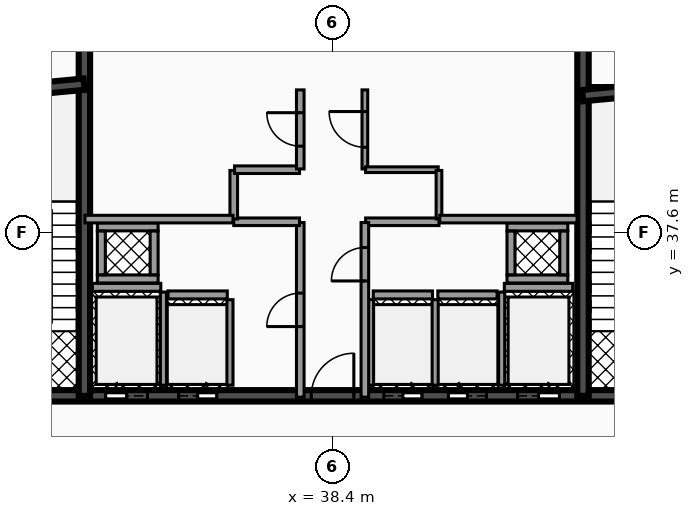
"""IFC4 building model, lengths in metres.
Left out: names, types, materials, properties, quantities, classifications, styles, units other than length and angle.
Written with IfcOpenShell. Run it as: python <this file> out.ifc"""

import sys

from ifc_helpers import new_model, si_unit, direction, frame, frame_2d, origin, place, context, subcontext, project, spatial, rectangle, extrude, element, fill, save


model = new_model("IFC4")
c1 = context("Model", 3, precision=1e-05, world=origin(), true_north=direction((0.0, 1.0)))
c2 = subcontext(c1, "Body", "Model", "MODEL_VIEW")
j1 = project(units=[si_unit("LENGTHUNIT", "METRE"), si_unit("PLANEANGLEUNIT", "RADIAN")], contexts=[c1])
p1 = place(None, origin())
s1 = spatial("IfcSite", under=j1, at=p1, CompositionType="ELEMENT")
p2 = place(p1, origin())
s2 = spatial("IfcBuilding", under=s1, at=p2, CompositionType="ELEMENT")
p3 = place(p2, frame((0.0, 0.0, 204.34)))
s3 = spatial("IfcBuildingStorey", under=s2, at=p3, CompositionType="ELEMENT", Elevation=204.34)
p4 = place(p3, frame((28.5, 33.3, 0.0), z_axis=(0.0, 0.0, 1.0), x_axis=(1.0, 0.0, 0.0)))
e1 = element("IfcWall", 1, at=p4, inside=s3, PredefinedType="SHEAR", context=c2, shape_type="SweptSolid", body=[
    extrude(rectangle(XDim=19.86, YDim=0.3, at=frame_2d((9.93, 0.0))), origin(), (0.0, 0.0, 1.0), 4.2),
])
p5 = place(p4, frame((3.93, 0.0, 0.0)))
e2 = element("IfcOpeningElement", 2, at=p5, cuts=e1, PredefinedType="OPENING", context=c2, shape_type="SweptSolid", body=[
    extrude(rectangle(XDim=1.1, YDim=2.15, at=frame_2d((0.55, 1.075))), frame((0.0, 0.16, 0.0), z_axis=(0.0, -1.0, 0.0), x_axis=(1.0, 0.0, 0.0)), (0.0, 0.0, 1.0), 0.32),
])
p6 = place(p4, frame((14.77, 0.0, 0.0)))
e3 = element("IfcOpeningElement", 3, at=p6, cuts=e1, PredefinedType="OPENING", context=c2, shape_type="SweptSolid", body=[
    extrude(rectangle(XDim=1.1, YDim=2.15, at=frame_2d((0.55, 1.075))), frame((0.0, 0.16, 0.0), z_axis=(0.0, -1.0, 0.0), x_axis=(1.0, 0.0, 0.0)), (0.0, 0.0, 1.0), 0.32),
])
p7 = place(p4, frame((11.25, 0.0, 0.0)))
e4 = element("IfcOpeningElement", 4, at=p7, cuts=e1, PredefinedType="OPENING", context=c2, shape_type="SweptSolid", body=[
    extrude(rectangle(XDim=1.0, YDim=2.1, at=frame_2d((0.5, 1.05))), frame((0.0, 0.16, 0.0), z_axis=(0.0, -1.0, 0.0), x_axis=(1.0, 0.0, 0.0)), (0.0, 0.0, 1.0), 0.32),
])
p8 = place(p4, frame((12.95, 0.0, 0.0)))
e5 = element("IfcOpeningElement", 5, at=p8, cuts=e1, PredefinedType="OPENING", context=c2, shape_type="SweptSolid", body=[
    extrude(rectangle(XDim=1.0, YDim=2.1, at=frame_2d((0.5, 1.05))), frame((0.0, 0.16, 0.0), z_axis=(0.0, -1.0, 0.0), x_axis=(1.0, 0.0, 0.0)), (0.0, 0.0, 1.0), 0.32),
])
p9 = place(p4, frame((5.85, 0.0, 0.0)))
e6 = element("IfcOpeningElement", 6, at=p9, cuts=e1, PredefinedType="OPENING", context=c2, shape_type="SweptSolid", body=[
    extrude(rectangle(XDim=1.0, YDim=2.1, at=frame_2d((0.5, 1.05))), frame((0.0, 0.16, 0.0), z_axis=(0.0, -1.0, 0.0), x_axis=(1.0, 0.0, 0.0)), (0.0, 0.0, 1.0), 0.32),
])
p10 = place(p4, frame((1.21, 0.0, 0.0)))
e7 = element("IfcOpeningElement", 7, at=p10, cuts=e1, PredefinedType="OPENING", context=c2, shape_type="SweptSolid", body=[
    extrude(rectangle(XDim=1.1, YDim=2.2, at=frame_2d((0.55, 1.1))), frame((0.0, 0.16, 0.0), z_axis=(0.0, -1.0, 0.0), x_axis=(1.0, 0.0, 0.0)), (0.0, 0.0, 1.0), 0.32),
])
p11 = place(p4, frame((9.34, 0.0, 0.0)))
e8 = element("IfcOpeningElement", 8, at=p11, cuts=e1, PredefinedType="OPENING", context=c2, shape_type="SweptSolid", body=[
    extrude(rectangle(XDim=1.12, YDim=2.05, at=frame_2d((0.56, 1.025))), frame((0.0, 0.16, 0.0), z_axis=(0.0, -1.0, 0.0), x_axis=(1.0, 0.0, 0.0)), (0.0, 0.0, 1.0), 0.32),
])
p12 = place(p4, frame((17.55, 0.0, 0.0)))
e9 = element("IfcOpeningElement", 9, at=p12, cuts=e1, PredefinedType="OPENING", context=c2, shape_type="SweptSolid", body=[
    extrude(rectangle(XDim=1.1, YDim=2.2, at=frame_2d((0.55, 1.1))), frame((0.0, 0.16, 0.0), z_axis=(0.0, -1.0, 0.0), x_axis=(1.0, 0.0, 0.0)), (0.0, 0.0, 1.0), 0.32),
])
for number, where, z_axis, x_axis in (
    (10, (31.87, 33.3, 0.0), (0.0, 0.0, 1.0), (0.0, 1.0, 0.0)),
    (11, (44.99, 33.3, 0.0), (0.0, 0.0, 1.0), (0.0, 1.0, 0.0)),
):
    element("IfcWall", number, at=place(p3, frame(where, z_axis=z_axis, x_axis=x_axis)), inside=s3, PredefinedType="SHEAR", context=c2, shape_type="SweptSolid", body=[
        extrude(rectangle(XDim=10.1, YDim=0.3, at=frame_2d((5.05, 0.0))), origin(), (0.0, 0.0, 1.0), 4.2),
    ])
p13 = place(p3, frame((28.64, 41.2, 0.0), z_axis=(0.0, 0.0, 1.0), x_axis=(0.995687118776, 0.092774789157, 0.0)))
e12 = element("IfcWall", 12, at=p13, inside=s3, PredefinedType="SHEAR", context=c2, shape_type="SweptSolid", body=[
    extrude(rectangle(XDim=3.234, YDim=0.3, at=frame_2d((1.617, 0.0))), origin(), (0.0, 0.0, 1.0), 4.2),
])
p14 = place(p3, frame((44.98, 41.2, 0.0), z_axis=(0.0, 0.0, 1.0), x_axis=(0.995686468965, 0.09278176286, 0.0)))
e13 = element("IfcWall", 13, at=p14, inside=s3, PredefinedType="SHEAR", context=c2, shape_type="SweptSolid", body=[
    extrude(rectangle(XDim=3.234, YDim=0.3, at=frame_2d((1.617, 0.0))), origin(), (0.0, 0.0, 1.0), 4.2),
])
p15 = place(p3, frame((32.08, 36.155, 0.0), z_axis=(0.0, 0.0, 1.0), x_axis=(1.0, 0.0, 0.0)))
e14 = element("IfcWall", 14, at=p15, inside=s3, PredefinedType="SOLIDWALL", context=c2, shape_type="SweptSolid", body=[
    extrude(rectangle(XDim=1.8, YDim=0.21, at=frame_2d((0.9, 0.0))), origin(), (0.0, 0.0, 1.0), 3.172),
])
p16 = place(p3, frame((33.95, 33.58, 0.0), z_axis=(0.0, 0.0, 1.0), x_axis=(0.0, 1.0, 0.0)))
e15 = element("IfcWall", 15, at=p16, inside=s3, PredefinedType="SOLIDWALL", context=c2, shape_type="SweptSolid", body=[
    extrude(rectangle(XDim=2.45, YDim=0.16, at=frame_2d((1.225, 0.0))), origin(), (0.0, 0.0, 1.0), 3.172),
])
p17 = place(p3, frame((42.92, 36.155, 0.0), z_axis=(0.0, 0.0, 1.0), x_axis=(1.0, 0.0, 0.0)))
e16 = element("IfcWall", 16, at=p17, inside=s3, PredefinedType="SOLIDWALL", context=c2, shape_type="SweptSolid", body=[
    extrude(rectangle(XDim=1.8, YDim=0.21, at=frame_2d((0.9, 0.0))), origin(), (0.0, 0.0, 1.0), 3.172),
])
p18 = place(p3, frame((42.85, 33.58, 0.0), z_axis=(0.0, 0.0, 1.0), x_axis=(0.0, 1.0, 0.0)))
e17 = element("IfcWall", 17, at=p18, inside=s3, PredefinedType="SOLIDWALL", context=c2, shape_type="SweptSolid", body=[
    extrude(rectangle(XDim=2.45, YDim=0.16, at=frame_2d((1.225, 0.0))), origin(), (0.0, 0.0, 1.0), 3.172),
])
p19 = place(p3, frame((39.47, 35.955, 0.0), z_axis=(0.0, 0.0, 1.0), x_axis=(1.0, 0.0, 0.0)))
e18 = element("IfcWall", 18, at=p19, inside=s3, PredefinedType="SOLIDWALL", context=c2, shape_type="SweptSolid", body=[
    extrude(rectangle(XDim=1.56, YDim=0.21, at=frame_2d((0.78, 0.0))), origin(), (0.0, 0.0, 1.0), 3.172),
])
for number, where, z_axis, x_axis in (
    (19, (39.4, 33.58, 0.0), (0.0, 0.0, 1.0), (0.0, 1.0, 0.0)),
    (20, (41.1, 33.58, 0.0), (0.0, 0.0, 1.0), (0.0, 1.0, 0.0)),
):
    element("IfcWall", number, at=place(p3, frame(where, z_axis=z_axis, x_axis=x_axis)), inside=s3, PredefinedType="SOLIDWALL", context=c2, shape_type="SweptSolid", body=[
        extrude(rectangle(XDim=2.25, YDim=0.16, at=frame_2d((1.125, 0.0))), origin(), (0.0, 0.0, 1.0), 3.172),
    ])
p20 = place(p3, frame((41.17, 35.955, 0.0), z_axis=(0.0, 0.0, 1.0), x_axis=(1.0, 0.0, 0.0)))
e21 = element("IfcWall", 21, at=p20, inside=s3, PredefinedType="SOLIDWALL", context=c2, shape_type="SweptSolid", body=[
    extrude(rectangle(XDim=1.56, YDim=0.21, at=frame_2d((0.78, 0.0))), origin(), (0.0, 0.0, 1.0), 3.172),
])
p21 = place(p3, frame((34.07, 35.955, 0.0), z_axis=(0.0, 0.0, 1.0), x_axis=(1.0, 0.0, 0.0)))
e22 = element("IfcWall", 22, at=p21, inside=s3, PredefinedType="SOLIDWALL", context=c2, shape_type="SweptSolid", body=[
    extrude(rectangle(XDim=1.56, YDim=0.21, at=frame_2d((0.78, 0.0))), origin(), (0.0, 0.0, 1.0), 3.172),
])
p22 = place(p3, frame((35.7, 33.58, 0.0), z_axis=(0.0, 0.0, 1.0), x_axis=(0.0, 1.0, 0.0)))
e23 = element("IfcWall", 23, at=p22, inside=s3, PredefinedType="SOLIDWALL", context=c2, shape_type="SweptSolid", body=[
    extrude(rectangle(XDim=2.25, YDim=0.16, at=frame_2d((1.125, 0.0))), origin(), (0.0, 0.0, 1.0), 3.172),
])
for number, where, z_axis, x_axis in (
    (24, (32.21, 36.375, 0.0), (0.0, 0.0, 1.0), (1.0, 0.0, 0.0)),
    (25, (32.21, 37.745, 0.0), (0.0, 0.0, 1.0), (1.0, 0.0, 0.0)),
):
    element("IfcWall", number, at=place(p3, frame(where, z_axis=z_axis, x_axis=x_axis)), inside=s3, PredefinedType="SOLIDWALL", context=c2, shape_type="SweptSolid", body=[
        extrude(rectangle(XDim=1.6, YDim=0.21, at=frame_2d((0.8, 0.0))), origin(), (0.0, 0.0, 1.0), 4.2),
    ])
for number, where, z_axis, x_axis in (
    (26, (32.315, 36.485, 0.0), (0.0, 0.0, 1.0), (0.0, 1.0, 0.0)),
    (27, (33.705, 36.485, 0.0), (0.0, 0.0, 1.0), (0.0, 1.0, 0.0)),
):
    element("IfcWall", number, at=place(p3, frame(where, z_axis=z_axis, x_axis=x_axis)), inside=s3, PredefinedType="SOLIDWALL", context=c2, shape_type="SweptSolid", body=[
        extrude(rectangle(XDim=1.15, YDim=0.21, at=frame_2d((0.575, 0.0))), origin(), (0.0, 0.0, 1.0), 4.2),
    ])
for number, where, z_axis, x_axis in (
    (28, (42.99, 36.375, 0.0), (0.0, 0.0, 1.0), (1.0, 0.0, 0.0)),
    (29, (42.99, 37.745, 0.0), (0.0, 0.0, 1.0), (1.0, 0.0, 0.0)),
):
    element("IfcWall", number, at=place(p3, frame(where, z_axis=z_axis, x_axis=x_axis)), inside=s3, PredefinedType="SOLIDWALL", context=c2, shape_type="SweptSolid", body=[
        extrude(rectangle(XDim=1.6, YDim=0.21, at=frame_2d((0.8, 0.0))), origin(), (0.0, 0.0, 1.0), 4.2),
    ])
for number, where, z_axis, x_axis in (
    (30, (43.095, 36.485, 0.0), (0.0, 0.0, 1.0), (0.0, 1.0, 0.0)),
    (31, (44.485, 36.485, 0.0), (0.0, 0.0, 1.0), (0.0, 1.0, 0.0)),
):
    element("IfcWall", number, at=place(p3, frame(where, z_axis=z_axis, x_axis=x_axis)), inside=s3, PredefinedType="SOLIDWALL", context=c2, shape_type="SweptSolid", body=[
        extrude(rectangle(XDim=1.15, YDim=0.21, at=frame_2d((0.575, 0.0))), origin(), (0.0, 0.0, 1.0), 4.2),
    ])
p23 = place(p3, frame((37.55, 33.265, 0.0), z_axis=(0.0, 0.0, 1.0), x_axis=(0.0, 1.0, 0.0)))
e32 = element("IfcWall", 32, at=p23, inside=s3, PredefinedType="PARTITIONING", context=c2, shape_type="SweptSolid", body=[
    extrude(rectangle(XDim=4.595, YDim=0.2, at=frame_2d((2.298, 0.0))), origin(), (0.0, 0.0, 1.0), 3.157),
])
p24 = place(p23, frame((1.857, 0.0, 0.0)))
e33 = element("IfcOpeningElement", 33, at=p24, cuts=e32, PredefinedType="OPENING", context=c2, shape_type="SweptSolid", body=[
    extrude(rectangle(XDim=0.88, YDim=2.05, at=frame_2d((0.44, 1.025))), frame((0.0, 0.11, 0.0), z_axis=(0.0, -1.0, 0.0), x_axis=(1.0, 0.0, 0.0)), (0.0, 0.0, 1.0), 0.22),
])
p25 = place(p3, frame((35.8, 37.88, 0.0), z_axis=(0.0, 0.0, 1.0), x_axis=(1.0, 0.0, 0.0)))
e34 = element("IfcWall", 34, at=p25, inside=s3, PredefinedType="PARTITIONING", context=c2, shape_type="SweptSolid", body=[
    extrude(rectangle(XDim=1.73, YDim=0.2, at=frame_2d((0.865, 0.0))), origin(), (0.0, 0.0, 1.0), 3.157),
])
p26 = place(p3, frame((35.8, 37.955, 0.0), z_axis=(0.0, 0.0, 1.0), x_axis=(0.0, 1.0, 0.0)))
e35 = element("IfcWall", 35, at=p26, inside=s3, PredefinedType="PARTITIONING", context=c2, shape_type="SweptSolid", body=[
    extrude(rectangle(XDim=1.275, YDim=0.2, at=frame_2d((0.637, 0.0))), origin(), (0.0, 0.0, 1.0), 3.157),
])
p27 = place(p3, frame((35.82, 39.25, 0.0), z_axis=(0.0, 0.0, 1.0), x_axis=(1.0, 0.0, 0.0)))
e36 = element("IfcWall", 36, at=p27, inside=s3, PredefinedType="PARTITIONING", context=c2, shape_type="SweptSolid", body=[
    extrude(rectangle(XDim=1.71, YDim=0.2, at=frame_2d((0.855, 0.0))), origin(), (0.0, 0.0, 1.0), 3.157),
])
p28 = place(p3, frame((37.55, 39.27, 0.0), z_axis=(0.0, 0.0, 1.0), x_axis=(0.0, 1.0, 0.0)))
e37 = element("IfcWall", 37, at=p28, inside=s3, PredefinedType="PARTITIONING", context=c2, shape_type="SweptSolid", body=[
    extrude(rectangle(XDim=2.08, YDim=0.2, at=frame_2d((1.04, 0.0))), origin(), (0.0, 0.0, 1.0), 3.157),
])
p29 = place(p28, frame((0.6, 0.0, 0.0)))
e38 = element("IfcOpeningElement", 38, at=p29, cuts=e37, PredefinedType="OPENING", context=c2, shape_type="SweptSolid", body=[
    extrude(rectangle(XDim=0.88, YDim=2.05, at=frame_2d((0.44, 1.025))), frame((0.0, 0.11, 0.0), z_axis=(0.0, -1.0, 0.0), x_axis=(1.0, 0.0, 0.0)), (0.0, 0.0, 1.0), 0.22),
])
p30 = place(p3, frame((39.27, 37.88, 0.0), z_axis=(0.0, 0.0, 1.0), x_axis=(1.0, 0.0, 0.0)))
e39 = element("IfcWall", 39, at=p30, inside=s3, PredefinedType="PARTITIONING", context=c2, shape_type="SweptSolid", body=[
    extrude(rectangle(XDim=1.93, YDim=0.2, at=frame_2d((0.965, 0.0))), origin(), (0.0, 0.0, 1.0), 3.157),
])
p31 = place(p3, frame((39.25, 33.265, 0.0), z_axis=(0.0, 0.0, 1.0), x_axis=(0.0, 1.0, 0.0)))
e40 = element("IfcWall", 40, at=p31, inside=s3, PredefinedType="PARTITIONING", context=c2, shape_type="SweptSolid", body=[
    extrude(rectangle(XDim=4.595, YDim=0.2, at=frame_2d((2.298, 0.0))), origin(), (0.0, 0.0, 1.0), 3.157),
])
p32 = place(p31, frame((3.058, 0.0, 0.0)))
e41 = element("IfcOpeningElement", 41, at=p32, cuts=e40, PredefinedType="OPENING", context=c2, shape_type="SweptSolid", body=[
    extrude(rectangle(XDim=0.88, YDim=2.05, at=frame_2d((0.44, 1.025))), frame((0.0, 0.11, 0.0), z_axis=(0.0, -1.0, 0.0), x_axis=(1.0, 0.0, 0.0)), (0.0, 0.0, 1.0), 0.22),
])
p33 = place(p3, frame((39.25, 39.27, 0.0), z_axis=(0.0, 0.0, 1.0), x_axis=(0.0, 1.0, 0.0)))
e42 = element("IfcWall", 42, at=p33, inside=s3, PredefinedType="PARTITIONING", context=c2, shape_type="SweptSolid", body=[
    extrude(rectangle(XDim=2.08, YDim=0.15, at=frame_2d((1.04, 0.0))), origin(), (0.0, 0.0, 1.0), 3.157),
])
p34 = place(p33, frame((0.57, 0.0, 0.0)))
e43 = element("IfcOpeningElement", 43, at=p34, cuts=e42, PredefinedType="OPENING", context=c2, shape_type="SweptSolid", body=[
    extrude(rectangle(XDim=0.94, YDim=2.05, at=frame_2d((0.47, 1.025))), frame((0.0, 0.085, 0.0), z_axis=(0.0, -1.0, 0.0), x_axis=(1.0, 0.0, 0.0)), (0.0, 0.0, 1.0), 0.17),
])
p35 = place(p3, frame((39.27, 39.25, 0.0), z_axis=(0.0, 0.0, 1.0), x_axis=(1.0, 0.0, 0.0)))
e44 = element("IfcWall", 44, at=p35, inside=s3, PredefinedType="PARTITIONING", context=c2, shape_type="SweptSolid", body=[
    extrude(rectangle(XDim=1.91, YDim=0.15, at=frame_2d((0.955, 0.0))), origin(), (0.0, 0.0, 1.0), 3.157),
])
p36 = place(p3, frame((41.2, 37.955, 0.0), z_axis=(0.0, 0.0, 1.0), x_axis=(0.0, 1.0, 0.0)))
e45 = element("IfcWall", 45, at=p36, inside=s3, PredefinedType="PARTITIONING", context=c2, shape_type="SweptSolid", body=[
    extrude(rectangle(XDim=1.275, YDim=0.15, at=frame_2d((0.637, 0.0))), origin(), (0.0, 0.0, 1.0), 3.157),
])
p37 = place(p3, frame((31.885, 37.95, 0.0), z_axis=(0.0, 0.0, 1.0), x_axis=(1.0, 0.0, 0.0)))
e46 = element("IfcWall", 46, at=p37, inside=s3, PredefinedType="PARTITIONING", context=c2, shape_type="SweptSolid", body=[
    extrude(rectangle(XDim=3.895, YDim=0.2, at=frame_2d((1.948, 0.0))), origin(), (0.0, 0.0, 1.0), 3.157),
])
p38 = place(p3, frame((41.22, 37.95, 0.0), z_axis=(0.0, 0.0, 1.0), x_axis=(1.0, 0.0, 0.0)))
e47 = element("IfcWall", 47, at=p38, inside=s3, PredefinedType="PARTITIONING", context=c2, shape_type="SweptSolid", body=[
    extrude(rectangle(XDim=3.615, YDim=0.2, at=frame_2d((1.808, 0.0))), origin(), (0.0, 0.0, 1.0), 3.157),
])
p39 = place(p5, origin())
e48 = element("IfcDoor", 48, at=p39, inside=s3, OperationType="SLIDING_TO_LEFT", PredefinedType="DOOR", context=c2, shape_type="SweptSolid", body=[
    extrude(rectangle(XDim=1.1, YDim=2.15, at=frame_2d((0.55, 1.075))), frame((0.0, 0.025, 0.0), z_axis=(0.0, -1.0, 0.0), x_axis=(1.0, 0.0, 0.0)), (0.0, 0.0, 1.0), 0.05),
])
fill(e2, e48)
p40 = place(p6, origin())
e49 = element("IfcDoor", 49, at=p40, inside=s3, OperationType="SLIDING_TO_RIGHT", PredefinedType="DOOR", context=c2, shape_type="SweptSolid", body=[
    extrude(rectangle(XDim=1.1, YDim=2.15, at=frame_2d((0.55, 1.075))), frame((0.0, 0.025, 0.0), z_axis=(0.0, -1.0, 0.0), x_axis=(1.0, 0.0, 0.0)), (0.0, 0.0, 1.0), 0.05),
])
fill(e3, e49)
p41 = place(p7, origin())
e50 = element("IfcDoor", 50, at=p41, inside=s3, OperationType="SLIDING_TO_RIGHT", PredefinedType="DOOR", context=c2, shape_type="SweptSolid", body=[
    extrude(rectangle(XDim=1.0, YDim=2.1, at=frame_2d((0.5, 1.05))), frame((0.0, 0.025, 0.0), z_axis=(0.0, -1.0, 0.0), x_axis=(1.0, 0.0, 0.0)), (0.0, 0.0, 1.0), 0.05),
])
fill(e4, e50)
p42 = place(p8, origin())
e51 = element("IfcDoor", 51, at=p42, inside=s3, OperationType="SLIDING_TO_LEFT", PredefinedType="DOOR", context=c2, shape_type="SweptSolid", body=[
    extrude(rectangle(XDim=1.0, YDim=2.1, at=frame_2d((0.5, 1.05))), frame((0.0, 0.025, 0.0), z_axis=(0.0, -1.0, 0.0), x_axis=(1.0, 0.0, 0.0)), (0.0, 0.0, 1.0), 0.05),
])
fill(e5, e51)
p43 = place(p9, origin())
e52 = element("IfcDoor", 52, at=p43, inside=s3, OperationType="SLIDING_TO_RIGHT", PredefinedType="DOOR", context=c2, shape_type="SweptSolid", body=[
    extrude(rectangle(XDim=1.0, YDim=2.1, at=frame_2d((0.5, 1.05))), frame((0.0, 0.025, 0.0), z_axis=(0.0, -1.0, 0.0), x_axis=(1.0, 0.0, 0.0)), (0.0, 0.0, 1.0), 0.05),
])
fill(e6, e52)
p44 = place(p11, origin())
e53 = element("IfcDoor", 53, at=p44, inside=s3, OperationType="SINGLE_SWING_RIGHT", PredefinedType="DOOR", context=c2, shape_type="SweptSolid", body=[
    extrude(rectangle(XDim=1.12, YDim=2.05, at=frame_2d((0.56, 1.025))), frame((0.0, 0.025, 0.0), z_axis=(0.0, -1.0, 0.0), x_axis=(1.0, 0.0, 0.0)), (0.0, 0.0, 1.0), 0.05),
])
fill(e8, e53)
p45 = place(p24, origin())
e54 = element("IfcDoor", 54, at=p45, inside=s3, OperationType="SINGLE_SWING_LEFT", PredefinedType="DOOR", context=c2, shape_type="SweptSolid", body=[
    extrude(rectangle(XDim=0.88, YDim=2.05, at=frame_2d((0.44, 1.025))), frame((0.0, 0.025, 0.0), z_axis=(0.0, -1.0, 0.0), x_axis=(1.0, 0.0, 0.0)), (0.0, 0.0, 1.0), 0.05),
])
fill(e33, e54)
p46 = place(p29, origin())
e55 = element("IfcDoor", 55, at=p46, inside=s3, OperationType="SINGLE_SWING_RIGHT", PredefinedType="DOOR", context=c2, shape_type="SweptSolid", body=[
    extrude(rectangle(XDim=0.88, YDim=2.05, at=frame_2d((0.44, 1.025))), frame((0.0, 0.025, 0.0), z_axis=(0.0, -1.0, 0.0), x_axis=(1.0, 0.0, 0.0)), (0.0, 0.0, 1.0), 0.05),
])
fill(e38, e55)
p47 = place(p32, origin())
e56 = element("IfcDoor", 56, at=p47, inside=s3, OperationType="SINGLE_SWING_LEFT", PredefinedType="DOOR", context=c2, shape_type="SweptSolid", body=[
    extrude(rectangle(XDim=0.88, YDim=2.05, at=frame_2d((0.44, 1.025))), frame((0.0, 0.025, 0.0), z_axis=(0.0, -1.0, 0.0), x_axis=(1.0, 0.0, 0.0)), (0.0, 0.0, 1.0), 0.05),
])
fill(e41, e56)
p48 = place(p34, origin())
e57 = element("IfcDoor", 57, at=p48, inside=s3, OperationType="SINGLE_SWING_RIGHT", PredefinedType="DOOR", context=c2, shape_type="SweptSolid", body=[
    extrude(rectangle(XDim=0.94, YDim=2.05, at=frame_2d((0.47, 1.025))), frame((0.0, 0.025, 0.0), z_axis=(0.0, -1.0, 0.0), x_axis=(1.0, 0.0, 0.0)), (0.0, 0.0, 1.0), 0.05),
])
fill(e43, e57)
save(model, sys.argv[1])
